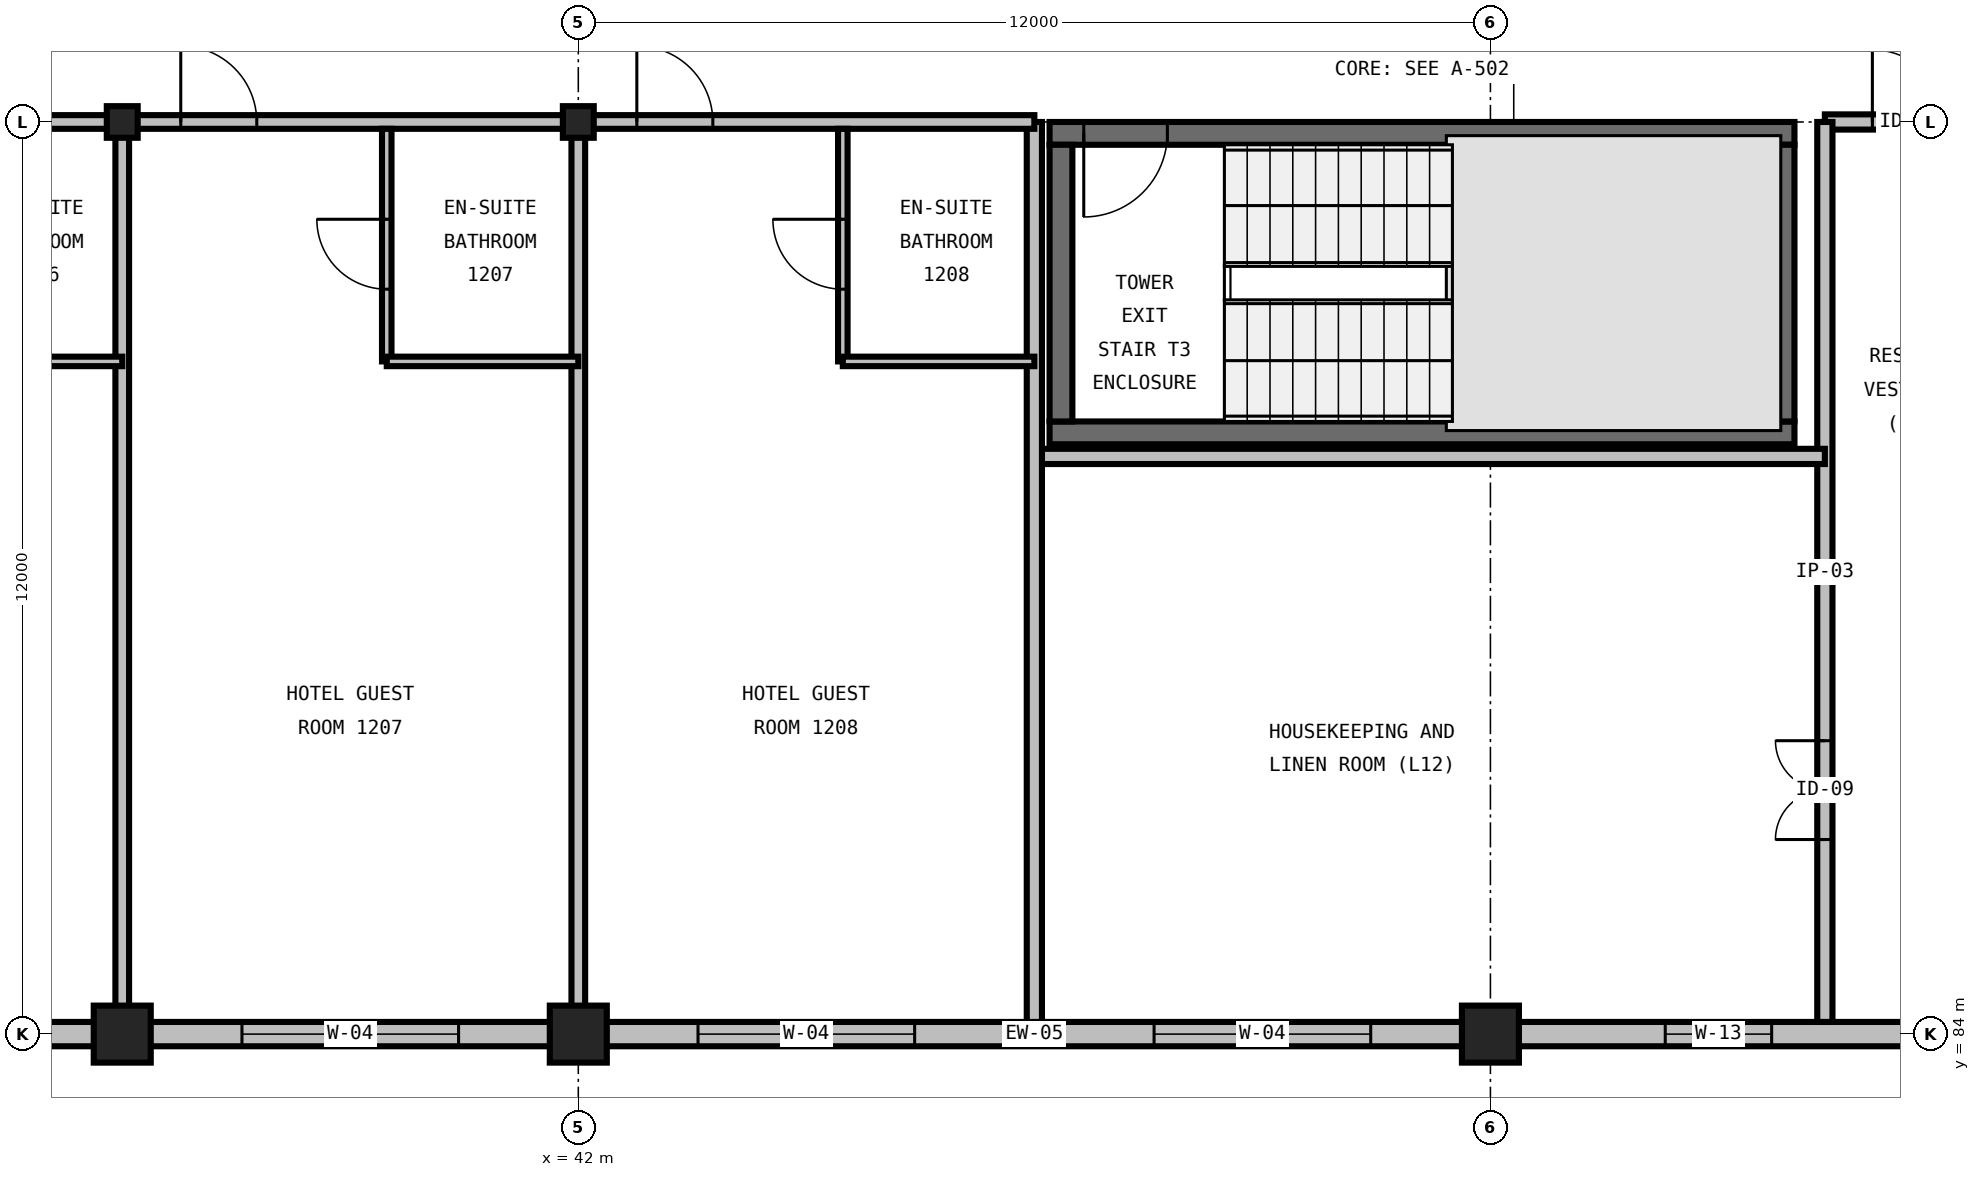
"""IFC4 building model, lengths in metres.
Left out: names, types, materials, properties, quantities, classifications, styles, units other than length and angle.
Written with IfcOpenShell. Run it as: python <this file> out.ifc"""

import sys

from ifc_helpers import new_model, si_unit, direction, frame, frame_2d, origin, origin_2d, place, context, subcontext, project, spatial, rectangle, i_section, extrude, element, fill, save


model = new_model("IFC4")
c1 = context("Model", 3, precision=1e-05, world=origin(), true_north=direction((0.0, 1.0)))
c2 = subcontext(c1, "Body", "Model", "MODEL_VIEW")
j1 = project(units=[si_unit("LENGTHUNIT", "METRE"), si_unit("PLANEANGLEUNIT", "RADIAN")], contexts=[c1])
p1 = place(None, origin())
s1 = spatial("IfcSite", under=j1, at=p1, CompositionType="ELEMENT")
p2 = place(p1, origin())
s2 = spatial("IfcBuilding", under=s1, at=p2, CompositionType="ELEMENT")
p3 = place(p2, frame((0.0, 0.0, 52.8)))
s3 = spatial("IfcBuildingStorey", under=s2, at=p3, CompositionType="ELEMENT", Elevation=52.8)
p4 = place(p3, frame((36.0, 84.0, 0.0), z_axis=(0.0, 0.0, 1.0), x_axis=(1.0, 0.0, 0.0)))
e1 = element("IfcColumn", 1, at=p4, inside=s3, PredefinedType="COLUMN", context=c2, shape_type="SweptSolid", body=[
    extrude(rectangle(XDim=0.75, YDim=0.75, at=origin_2d()), origin(), (0.0, 0.0, 1.0), 3.6),
])
p5 = place(p3, frame((36.0, 96.0, 0.0), z_axis=(0.0, 0.0, 1.0), x_axis=(1.0, 0.0, 0.0)))
e2 = element("IfcColumn", 2, at=p5, inside=s3, PredefinedType="COLUMN", context=c2, shape_type="SweptSolid", body=[
    extrude(i_section(OverallWidth=0.406, OverallDepth=0.416, WebThickness=0.03, FlangeThickness=0.048, FilletRadius=0.031, at=origin_2d()), origin(), (0.0, 0.0, 1.0), 3.6),
])
p6 = place(p3, frame((42.0, 84.0, 0.0), z_axis=(0.0, 0.0, 1.0), x_axis=(1.0, 0.0, 0.0)))
e3 = element("IfcColumn", 3, at=p6, inside=s3, PredefinedType="COLUMN", context=c2, shape_type="SweptSolid", body=[
    extrude(rectangle(XDim=0.75, YDim=0.75, at=origin_2d()), origin(), (0.0, 0.0, 1.0), 3.6),
])
p7 = place(p3, frame((42.0, 96.0, 0.0), z_axis=(0.0, 0.0, 1.0), x_axis=(1.0, 0.0, 0.0)))
e4 = element("IfcColumn", 4, at=p7, inside=s3, PredefinedType="COLUMN", context=c2, shape_type="SweptSolid", body=[
    extrude(i_section(OverallWidth=0.406, OverallDepth=0.416, WebThickness=0.03, FlangeThickness=0.048, FilletRadius=0.031, at=origin_2d()), origin(), (0.0, 0.0, 1.0), 3.6),
])
p8 = place(p3, frame((54.0, 84.0, 0.0), z_axis=(0.0, 0.0, 1.0), x_axis=(1.0, 0.0, 0.0)))
e5 = element("IfcColumn", 5, at=p8, inside=s3, PredefinedType="COLUMN", context=c2, shape_type="SweptSolid", body=[
    extrude(rectangle(XDim=0.75, YDim=0.75, at=origin_2d()), origin(), (0.0, 0.0, 1.0), 3.6),
])
p9 = place(p3, frame((48.2, 91.91, 0.0), z_axis=(0.0, 0.0, 1.0), x_axis=(1.0, 0.0, 0.0)))
e6 = element("IfcWall", 6, at=p9, inside=s3, PredefinedType="SHEAR", context=c2, shape_type="SweptSolid", body=[
    extrude(rectangle(XDim=9.8, YDim=0.3, at=frame_2d((4.9, 0.0))), origin(), (0.0, 0.0, 1.0), 3.6),
])
p10 = place(p3, frame((58.0, 95.85, 0.0), z_axis=(0.0, 0.0, 1.0), x_axis=(-1.0, 0.0, 0.0)))
e7 = element("IfcWall", 7, at=p10, inside=s3, PredefinedType="SHEAR", context=c2, shape_type="SweptSolid", body=[
    extrude(rectangle(XDim=9.8, YDim=0.3, at=frame_2d((4.9, 0.0))), origin(), (0.0, 0.0, 1.0), 3.6),
])
p11 = place(p10, frame((8.25, 0.0, 0.0)))
e8 = element("IfcOpeningElement", 8, at=p11, cuts=e7, PredefinedType="OPENING", context=c2, shape_type="SweptSolid", body=[
    extrude(rectangle(XDim=1.1, YDim=2.2, at=frame_2d((0.55, 1.1))), frame((0.0, 0.165, 0.0), z_axis=(0.0, -1.0, 0.0), x_axis=(1.0, 0.0, 0.0)), (0.0, 0.0, 1.0), 0.33),
])
for number, where, z_axis, x_axis in (
    (9, (48.35, 95.7, 0.0), (0.0, 0.0, 1.0), (0.0, -1.0, 0.0)),
    (10, (57.85, 92.06, 0.0), (0.0, 0.0, 1.0), (0.0, 1.0, 0.0)),
):
    element("IfcWall", number, at=place(p3, frame(where, z_axis=z_axis, x_axis=x_axis)), inside=s3, PredefinedType="SHEAR", context=c2, shape_type="SweptSolid", body=[
        extrude(rectangle(XDim=3.64, YDim=0.3, at=frame_2d((1.82, 0.0))), origin(), (0.0, 0.0, 1.0), 3.6),
    ])
p12 = place(p3, frame((30.0, 84.0, 0.0), z_axis=(0.0, 0.0, 1.0), x_axis=(1.0, 0.0, 0.0)))
e11 = element("IfcWall", 11, at=p12, inside=s3, PredefinedType="STANDARD", context=c2, shape_type="SweptSolid", body=[
    extrude(rectangle(XDim=6.0, YDim=0.32, at=frame_2d((3.0, 0.0))), origin(), (0.0, 0.0, 1.0), 2.536),
])
p13 = place(p12, frame((1.575, 0.0, 0.7)))
e12 = element("IfcOpeningElement", 12, at=p13, cuts=e11, PredefinedType="OPENING", context=c2, shape_type="SweptSolid", body=[
    extrude(rectangle(XDim=2.85, YDim=1.65, at=frame_2d((1.425, 0.825))), frame((0.0, 0.175, 0.0), z_axis=(0.0, -1.0, 0.0), x_axis=(1.0, 0.0, 0.0)), (0.0, 0.0, 1.0), 0.35),
])
p14 = place(p3, frame((36.0, 84.0, 0.0), z_axis=(0.0, 0.0, 1.0), x_axis=(1.0, 0.0, 0.0)))
e13 = element("IfcWall", 13, at=p14, inside=s3, PredefinedType="STANDARD", context=c2, shape_type="SweptSolid", body=[
    extrude(rectangle(XDim=6.0, YDim=0.32, at=frame_2d((3.0, 0.0))), origin(), (0.0, 0.0, 1.0), 2.536),
])
p15 = place(p14, frame((1.575, 0.0, 0.7)))
e14 = element("IfcOpeningElement", 14, at=p15, cuts=e13, PredefinedType="OPENING", context=c2, shape_type="SweptSolid", body=[
    extrude(rectangle(XDim=2.85, YDim=1.65, at=frame_2d((1.425, 0.825))), frame((0.0, 0.175, 0.0), z_axis=(0.0, -1.0, 0.0), x_axis=(1.0, 0.0, 0.0)), (0.0, 0.0, 1.0), 0.35),
])
p16 = place(p3, frame((42.0, 84.0, 0.0), z_axis=(0.0, 0.0, 1.0), x_axis=(1.0, 0.0, 0.0)))
e15 = element("IfcWall", 15, at=p16, inside=s3, PredefinedType="STANDARD", context=c2, shape_type="SweptSolid", body=[
    extrude(rectangle(XDim=12.0, YDim=0.32, at=frame_2d((6.0, 0.0))), origin(), (0.0, 0.0, 1.0), 2.536),
])
p17 = place(p16, frame((1.575, 0.0, 0.7)))
e16 = element("IfcOpeningElement", 16, at=p17, cuts=e15, PredefinedType="OPENING", context=c2, shape_type="SweptSolid", body=[
    extrude(rectangle(XDim=2.85, YDim=1.65, at=frame_2d((1.425, 0.825))), frame((0.0, 0.175, 0.0), z_axis=(0.0, -1.0, 0.0), x_axis=(1.0, 0.0, 0.0)), (0.0, 0.0, 1.0), 0.35),
])
p18 = place(p16, frame((7.575, 0.0, 0.7)))
e17 = element("IfcOpeningElement", 17, at=p18, cuts=e15, PredefinedType="OPENING", context=c2, shape_type="SweptSolid", body=[
    extrude(rectangle(XDim=2.85, YDim=1.65, at=frame_2d((1.425, 0.825))), frame((0.0, 0.175, 0.0), z_axis=(0.0, -1.0, 0.0), x_axis=(1.0, 0.0, 0.0)), (0.0, 0.0, 1.0), 0.35),
])
p19 = place(p3, frame((54.0, 84.0, 0.0), z_axis=(0.0, 0.0, 1.0), x_axis=(1.0, 0.0, 0.0)))
e18 = element("IfcWall", 18, at=p19, inside=s3, PredefinedType="STANDARD", context=c2, shape_type="SweptSolid", body=[
    extrude(rectangle(XDim=12.0, YDim=0.32, at=frame_2d((6.0, 0.0))), origin(), (0.0, 0.0, 1.0), 2.536),
])
p20 = place(p19, frame((2.3, 0.0, 1.0)))
e19 = element("IfcOpeningElement", 19, at=p20, cuts=e18, PredefinedType="OPENING", context=c2, shape_type="SweptSolid", body=[
    extrude(rectangle(XDim=1.4, YDim=1.4, at=frame_2d((0.7, 0.7))), frame((0.0, 0.175, 0.0), z_axis=(0.0, -1.0, 0.0), x_axis=(1.0, 0.0, 0.0)), (0.0, 0.0, 1.0), 0.35),
])
p21 = place(p19, frame((8.25, 0.0, 1.0)))
e20 = element("IfcOpeningElement", 20, at=p21, cuts=e18, PredefinedType="OPENING", context=c2, shape_type="SweptSolid", body=[
    extrude(rectangle(XDim=1.5, YDim=1.35, at=frame_2d((0.75, 0.675))), frame((0.0, 0.175, 0.0), z_axis=(0.0, -1.0, 0.0), x_axis=(1.0, 0.0, 0.0)), (0.0, 0.0, 1.0), 0.35),
])
p22 = place(p3, frame((58.4, 96.0, 0.0), z_axis=(0.0, 0.0, 1.0), x_axis=(1.0, 0.0, 0.0)))
e21 = element("IfcWall", 21, at=p22, inside=s3, PredefinedType="PARTITIONING", context=c2, shape_type="SweptSolid", body=[
    extrude(rectangle(XDim=2.4, YDim=0.2, at=frame_2d((1.2, 0.0))), origin(), (0.0, 0.0, 1.0), 2.359),
])
p23 = place(p22, frame((0.625, 0.0, 0.0)))
e22 = element("IfcOpeningElement", 22, at=p23, cuts=e21, PredefinedType="OPENING", context=c2, shape_type="SweptSolid", body=[
    extrude(rectangle(XDim=0.95, YDim=2.15, at=frame_2d((0.475, 1.075))), frame((0.0, 0.115, 0.0), z_axis=(0.0, -1.0, 0.0), x_axis=(1.0, 0.0, 0.0)), (0.0, 0.0, 1.0), 0.23),
])
p24 = place(p3, frame((58.4, 84.16, 0.0), z_axis=(0.0, 0.0, 1.0), x_axis=(0.0, 1.0, 0.0)))
e23 = element("IfcWall", 23, at=p24, inside=s3, PredefinedType="PARTITIONING", context=c2, shape_type="SweptSolid", body=[
    extrude(rectangle(XDim=11.84, YDim=0.2, at=frame_2d((5.92, 0.0))), origin(), (0.0, 0.0, 1.0), 3.29),
])
p25 = place(p24, frame((2.4, 0.0, 0.0)))
e24 = element("IfcOpeningElement", 24, at=p25, cuts=e23, PredefinedType="OPENING", context=c2, shape_type="SweptSolid", body=[
    extrude(rectangle(XDim=1.3, YDim=2.2, at=frame_2d((0.65, 1.1))), frame((0.0, 0.115, 0.0), z_axis=(0.0, -1.0, 0.0), x_axis=(1.0, 0.0, 0.0)), (0.0, 0.0, 1.0), 0.23),
])
p26 = place(p3, frame((48.0, 91.6, 0.0), z_axis=(0.0, 0.0, 1.0), x_axis=(1.0, 0.0, 0.0)))
e25 = element("IfcWall", 25, at=p26, inside=s3, PredefinedType="PARTITIONING", context=c2, shape_type="SweptSolid", body=[
    extrude(rectangle(XDim=10.4, YDim=0.2, at=frame_2d((5.2, 0.0))), origin(), (0.0, 0.0, 1.0), 3.29),
])
p27 = place(p3, frame((48.0, 84.16, 0.0), z_axis=(0.0, 0.0, 1.0), x_axis=(0.0, 1.0, 0.0)))
e26 = element("IfcWall", 26, at=p27, inside=s3, PredefinedType="PARTITIONING", context=c2, shape_type="SweptSolid", body=[
    extrude(rectangle(XDim=11.84, YDim=0.2, at=frame_2d((5.92, 0.0))), origin(), (0.0, 0.0, 1.0), 3.29),
])
p28 = place(p3, frame((30.085, 96.0, 0.0), z_axis=(0.0, 0.0, 1.0), x_axis=(1.0, 0.0, 0.0)))
e27 = element("IfcWall", 27, at=p28, inside=s3, PredefinedType="PARTITIONING", context=c2, shape_type="SweptSolid", body=[
    extrude(rectangle(XDim=5.915, YDim=0.18, at=frame_2d((2.957, 0.0))), origin(), (0.0, 0.0, 1.0), 2.736),
])
p29 = place(p28, frame((0.685, 0.0, 0.0)))
e28 = element("IfcOpeningElement", 28, at=p29, cuts=e27, PredefinedType="OPENING", context=c2, shape_type="SweptSolid", body=[
    extrude(rectangle(XDim=1.0, YDim=2.15, at=frame_2d((0.5, 1.075))), frame((0.0, 0.105, 0.0), z_axis=(0.0, -1.0, 0.0), x_axis=(1.0, 0.0, 0.0)), (0.0, 0.0, 1.0), 0.21),
])
p30 = place(p3, frame((36.0, 84.16, 0.0), z_axis=(0.0, 0.0, 1.0), x_axis=(0.0, 1.0, 0.0)))
e29 = element("IfcWall", 29, at=p30, inside=s3, PredefinedType="PARTITIONING", context=c2, shape_type="SweptSolid", body=[
    extrude(rectangle(XDim=11.84, YDim=0.18, at=frame_2d((5.92, 0.0))), origin(), (0.0, 0.0, 1.0), 2.59),
])
p31 = place(p3, frame((33.52, 92.85, 0.0), z_axis=(0.0, 0.0, 1.0), x_axis=(1.0, 0.0, 0.0)))
e30 = element("IfcWall", 30, at=p31, inside=s3, PredefinedType="PARTITIONING", context=c2, shape_type="SweptSolid", body=[
    extrude(rectangle(XDim=2.48, YDim=0.125, at=frame_2d((1.24, 0.0))), origin(), (0.0, 0.0, 1.0), 3.29),
])
p32 = place(p3, frame((36.0, 96.0, 0.0), z_axis=(0.0, 0.0, 1.0), x_axis=(1.0, 0.0, 0.0)))
e31 = element("IfcWall", 31, at=p32, inside=s3, PredefinedType="PARTITIONING", context=c2, shape_type="SweptSolid", body=[
    extrude(rectangle(XDim=6.0, YDim=0.18, at=frame_2d((3.0, 0.0))), origin(), (0.0, 0.0, 1.0), 2.736),
])
p33 = place(p32, frame((0.77, 0.0, 0.0)))
e32 = element("IfcOpeningElement", 32, at=p33, cuts=e31, PredefinedType="OPENING", context=c2, shape_type="SweptSolid", body=[
    extrude(rectangle(XDim=1.0, YDim=2.15, at=frame_2d((0.5, 1.075))), frame((0.0, 0.105, 0.0), z_axis=(0.0, -1.0, 0.0), x_axis=(1.0, 0.0, 0.0)), (0.0, 0.0, 1.0), 0.21),
])
p34 = place(p3, frame((42.0, 84.16, 0.0), z_axis=(0.0, 0.0, 1.0), x_axis=(0.0, 1.0, 0.0)))
e33 = element("IfcWall", 33, at=p34, inside=s3, PredefinedType="PARTITIONING", context=c2, shape_type="SweptSolid", body=[
    extrude(rectangle(XDim=11.84, YDim=0.18, at=frame_2d((5.92, 0.0))), origin(), (0.0, 0.0, 1.0), 2.59),
])
p35 = place(p3, frame((39.48, 92.85, 0.0), z_axis=(0.0, 0.0, 1.0), x_axis=(0.0, 1.0, 0.0)))
e34 = element("IfcWall", 34, at=p35, inside=s3, PredefinedType="PARTITIONING", context=c2, shape_type="SweptSolid", body=[
    extrude(rectangle(XDim=3.06, YDim=0.125, at=frame_2d((1.53, 0.0))), origin(), (0.0, 0.0, 1.0), 3.29),
])
p36 = place(p35, frame((0.95, 0.0, 0.0)))
e35 = element("IfcOpeningElement", 35, at=p36, cuts=e34, PredefinedType="OPENING", context=c2, shape_type="SweptSolid", body=[
    extrude(rectangle(XDim=0.92, YDim=2.1, at=frame_2d((0.46, 1.05))), frame((0.0, 0.077, 0.0), z_axis=(0.0, -1.0, 0.0), x_axis=(1.0, 0.0, 0.0)), (0.0, 0.0, 1.0), 0.155),
])
p37 = place(p3, frame((39.48, 92.85, 0.0), z_axis=(0.0, 0.0, 1.0), x_axis=(1.0, 0.0, 0.0)))
e36 = element("IfcWall", 36, at=p37, inside=s3, PredefinedType="PARTITIONING", context=c2, shape_type="SweptSolid", body=[
    extrude(rectangle(XDim=2.52, YDim=0.125, at=frame_2d((1.26, 0.0))), origin(), (0.0, 0.0, 1.0), 3.29),
])
p38 = place(p3, frame((42.0, 96.0, 0.0), z_axis=(0.0, 0.0, 1.0), x_axis=(1.0, 0.0, 0.0)))
e37 = element("IfcWall", 37, at=p38, inside=s3, PredefinedType="PARTITIONING", context=c2, shape_type="SweptSolid", body=[
    extrude(rectangle(XDim=6.0, YDim=0.18, at=frame_2d((3.0, 0.0))), origin(), (0.0, 0.0, 1.0), 2.359),
])
p39 = place(p38, frame((0.77, 0.0, 0.0)))
e38 = element("IfcOpeningElement", 38, at=p39, cuts=e37, PredefinedType="OPENING", context=c2, shape_type="SweptSolid", body=[
    extrude(rectangle(XDim=1.0, YDim=2.15, at=frame_2d((0.5, 1.075))), frame((0.0, 0.105, 0.0), z_axis=(0.0, -1.0, 0.0), x_axis=(1.0, 0.0, 0.0)), (0.0, 0.0, 1.0), 0.21),
])
p40 = place(p3, frame((45.48, 92.85, 0.0), z_axis=(0.0, 0.0, 1.0), x_axis=(0.0, 1.0, 0.0)))
e39 = element("IfcWall", 39, at=p40, inside=s3, PredefinedType="PARTITIONING", context=c2, shape_type="SweptSolid", body=[
    extrude(rectangle(XDim=3.06, YDim=0.125, at=frame_2d((1.53, 0.0))), origin(), (0.0, 0.0, 1.0), 3.29),
])
p41 = place(p40, frame((0.95, 0.0, 0.0)))
e40 = element("IfcOpeningElement", 40, at=p41, cuts=e39, PredefinedType="OPENING", context=c2, shape_type="SweptSolid", body=[
    extrude(rectangle(XDim=0.92, YDim=2.1, at=frame_2d((0.46, 1.05))), frame((0.0, 0.077, 0.0), z_axis=(0.0, -1.0, 0.0), x_axis=(1.0, 0.0, 0.0)), (0.0, 0.0, 1.0), 0.155),
])
p42 = place(p3, frame((45.48, 92.85, 0.0), z_axis=(0.0, 0.0, 1.0), x_axis=(1.0, 0.0, 0.0)))
e41 = element("IfcWall", 41, at=p42, inside=s3, PredefinedType="PARTITIONING", context=c2, shape_type="SweptSolid", body=[
    extrude(rectangle(XDim=2.52, YDim=0.125, at=frame_2d((1.26, 0.0))), origin(), (0.0, 0.0, 1.0), 3.29),
])
p43 = place(p11, origin())
e42 = element("IfcDoor", 42, at=p43, inside=s3, OperationType="SINGLE_SWING_RIGHT", PredefinedType="DOOR", context=c2, shape_type="SweptSolid", body=[
    extrude(rectangle(XDim=1.1, YDim=2.2, at=frame_2d((0.55, 1.1))), frame((0.0, 0.025, 0.0), z_axis=(0.0, -1.0, 0.0), x_axis=(1.0, 0.0, 0.0)), (0.0, 0.0, 1.0), 0.05),
])
fill(e8, e42)
p44 = place(p15, origin())
e43 = element("IfcWindow", 43, at=p44, inside=s3, PartitioningType="TRIPLE_PANEL_VERTICAL", PredefinedType="WINDOW", context=c2, shape_type="SweptSolid", body=[
    extrude(rectangle(XDim=2.85, YDim=1.65, at=frame_2d((1.425, 0.825))), frame((0.0, 0.03, 0.0), z_axis=(0.0, -1.0, 0.0), x_axis=(1.0, 0.0, 0.0)), (0.0, 0.0, 1.0), 0.06),
])
fill(e14, e43)
p45 = place(p17, origin())
e44 = element("IfcWindow", 44, at=p45, inside=s3, PartitioningType="TRIPLE_PANEL_VERTICAL", PredefinedType="WINDOW", context=c2, shape_type="SweptSolid", body=[
    extrude(rectangle(XDim=2.85, YDim=1.65, at=frame_2d((1.425, 0.825))), frame((0.0, 0.03, 0.0), z_axis=(0.0, -1.0, 0.0), x_axis=(1.0, 0.0, 0.0)), (0.0, 0.0, 1.0), 0.06),
])
fill(e16, e44)
p46 = place(p18, origin())
e45 = element("IfcWindow", 45, at=p46, inside=s3, PartitioningType="TRIPLE_PANEL_VERTICAL", PredefinedType="WINDOW", context=c2, shape_type="SweptSolid", body=[
    extrude(rectangle(XDim=2.85, YDim=1.65, at=frame_2d((1.425, 0.825))), frame((0.0, 0.03, 0.0), z_axis=(0.0, -1.0, 0.0), x_axis=(1.0, 0.0, 0.0)), (0.0, 0.0, 1.0), 0.06),
])
fill(e17, e45)
p47 = place(p20, origin())
e46 = element("IfcWindow", 46, at=p47, inside=s3, PartitioningType="SINGLE_PANEL", PredefinedType="WINDOW", context=c2, shape_type="SweptSolid", body=[
    extrude(rectangle(XDim=1.4, YDim=1.4, at=frame_2d((0.7, 0.7))), frame((0.0, 0.03, 0.0), z_axis=(0.0, -1.0, 0.0), x_axis=(1.0, 0.0, 0.0)), (0.0, 0.0, 1.0), 0.06),
])
fill(e19, e46)
p48 = place(p23, origin())
e47 = element("IfcDoor", 47, at=p48, inside=s3, OperationType="SINGLE_SWING_LEFT", PredefinedType="DOOR", context=c2, shape_type="SweptSolid", body=[
    extrude(rectangle(XDim=0.95, YDim=2.15, at=frame_2d((0.475, 1.075))), frame((0.0, 0.025, 0.0), z_axis=(0.0, -1.0, 0.0), x_axis=(1.0, 0.0, 0.0)), (0.0, 0.0, 1.0), 0.05),
])
fill(e22, e47)
p49 = place(p25, origin())
e48 = element("IfcDoor", 48, at=p49, inside=s3, OperationType="DOUBLE_DOOR_SINGLE_SWING", PredefinedType="DOOR", context=c2, shape_type="SweptSolid", body=[
    extrude(rectangle(XDim=1.3, YDim=2.2, at=frame_2d((0.65, 1.1))), frame((0.0, 0.025, 0.0), z_axis=(0.0, -1.0, 0.0), x_axis=(1.0, 0.0, 0.0)), (0.0, 0.0, 1.0), 0.05),
])
fill(e24, e48)
p50 = place(p33, origin())
e49 = element("IfcDoor", 49, at=p50, inside=s3, OperationType="SINGLE_SWING_LEFT", PredefinedType="DOOR", context=c2, shape_type="SweptSolid", body=[
    extrude(rectangle(XDim=1.0, YDim=2.15, at=frame_2d((0.5, 1.075))), frame((0.0, 0.025, 0.0), z_axis=(0.0, -1.0, 0.0), x_axis=(1.0, 0.0, 0.0)), (0.0, 0.0, 1.0), 0.05),
])
fill(e32, e49)
p51 = place(p36, origin())
e50 = element("IfcDoor", 50, at=p51, inside=s3, OperationType="SINGLE_SWING_RIGHT", PredefinedType="DOOR", context=c2, shape_type="SweptSolid", body=[
    extrude(rectangle(XDim=0.92, YDim=2.1, at=frame_2d((0.46, 1.05))), frame((0.0, 0.025, 0.0), z_axis=(0.0, -1.0, 0.0), x_axis=(1.0, 0.0, 0.0)), (0.0, 0.0, 1.0), 0.05),
])
fill(e35, e50)
p52 = place(p39, origin())
e51 = element("IfcDoor", 51, at=p52, inside=s3, OperationType="SINGLE_SWING_LEFT", PredefinedType="DOOR", context=c2, shape_type="SweptSolid", body=[
    extrude(rectangle(XDim=1.0, YDim=2.15, at=frame_2d((0.5, 1.075))), frame((0.0, 0.025, 0.0), z_axis=(0.0, -1.0, 0.0), x_axis=(1.0, 0.0, 0.0)), (0.0, 0.0, 1.0), 0.05),
])
fill(e38, e51)
p53 = place(p41, origin())
e52 = element("IfcDoor", 52, at=p53, inside=s3, OperationType="SINGLE_SWING_RIGHT", PredefinedType="DOOR", context=c2, shape_type="SweptSolid", body=[
    extrude(rectangle(XDim=0.92, YDim=2.1, at=frame_2d((0.46, 1.05))), frame((0.0, 0.025, 0.0), z_axis=(0.0, -1.0, 0.0), x_axis=(1.0, 0.0, 0.0)), (0.0, 0.0, 1.0), 0.05),
])
fill(e40, e52)
save(model, sys.argv[1])
